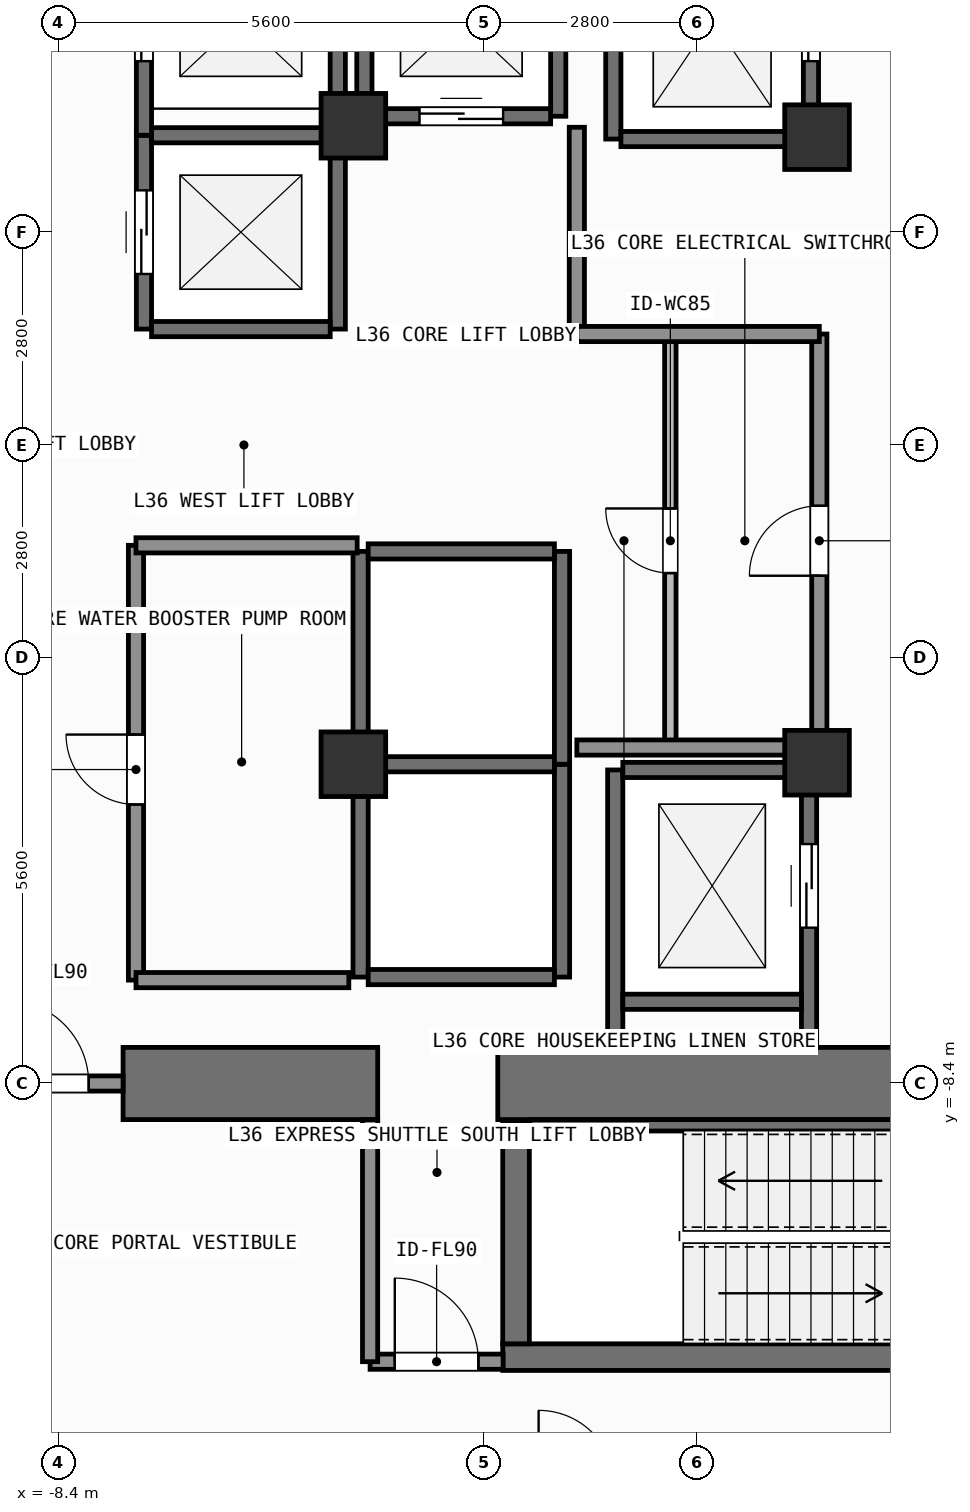
"""IFC4 building model, lengths in metres.
Left out: names, types, materials, properties, quantities, classifications, styles, units other than length and angle.
Written with IfcOpenShell. Run it as: python <this file> out.ifc"""

import sys

from ifc_helpers import new_model, si_unit, direction, frame, frame_2d, origin, origin_2d, place, context, subcontext, project, spatial, rectangle, extrude, element, fill, save


model = new_model("IFC4")
c1 = context("Model", 3, precision=1e-05, world=origin(), true_north=direction((0.0, 1.0)))
c2 = subcontext(c1, "Body", "Model", "MODEL_VIEW")
j1 = project(units=[si_unit("LENGTHUNIT", "METRE"), si_unit("PLANEANGLEUNIT", "RADIAN")], contexts=[c1])
p1 = place(None, origin())
s1 = spatial("IfcSite", under=j1, at=p1, CompositionType="ELEMENT")
p2 = place(p1, origin())
s2 = spatial("IfcBuilding", under=s1, at=p2, CompositionType="ELEMENT")
p3 = place(p2, frame((0.0, 0.0, 144.6)))
s3 = spatial("IfcBuildingStorey", under=s2, at=p3, CompositionType="ELEMENT", Elevation=144.6)
p4 = place(p3, frame((-7.55, -8.4, 0.0), z_axis=(0.0, 0.0, 1.0), x_axis=(1.0, 0.0, 0.0)))
e1 = element("IfcWall", 1, at=p4, inside=s3, PredefinedType="SHEAR", context=c2, shape_type="SweptSolid", body=[
    extrude(rectangle(XDim=3.35, YDim=0.95, at=frame_2d((1.675, 0.0))), origin(), (0.0, 0.0, 1.0), 3.9),
])
p5 = place(p3, frame((-2.62, -8.4, 0.0), z_axis=(0.0, 0.0, 1.0), x_axis=(1.0, 0.0, 0.0)))
e2 = element("IfcWall", 2, at=p5, inside=s3, PredefinedType="SHEAR", context=c2, shape_type="SweptSolid", body=[
    extrude(rectangle(XDim=7.27, YDim=0.95, at=frame_2d((3.635, 0.0))), origin(), (0.0, 0.0, 1.0), 3.9),
])
p6 = place(p3, frame((-2.555, -12.0, 0.0), z_axis=(0.0, 0.0, 1.0), x_axis=(1.0, 0.0, 0.0)))
e3 = element("IfcWall", 3, at=p6, inside=s3, PredefinedType="SHEAR", context=c2, shape_type="SweptSolid", body=[
    extrude(rectangle(XDim=7.31, YDim=0.35, at=frame_2d((3.655, 0.0))), origin(), (0.0, 0.0, 1.0), 3.9),
])
p7 = place(p3, frame((-2.2, -8.95, 0.0), z_axis=(0.0, 0.0, 1.0), x_axis=(1.0, 0.0, 0.0)))
e4 = element("IfcWall", 4, at=p7, inside=s3, PredefinedType="SHEAR", context=c2, shape_type="SweptSolid", body=[
    extrude(rectangle(XDim=6.6, YDim=0.15, at=frame_2d((3.3, 0.0))), origin(), (0.0, 0.0, 1.0), 3.9),
])
p8 = place(p3, frame((-2.38, -11.825, 0.0), z_axis=(0.0, 0.0, 1.0), x_axis=(0.0, 1.0, 0.0)))
e5 = element("IfcWall", 5, at=p8, inside=s3, PredefinedType="SHEAR", context=c2, shape_type="SweptSolid", body=[
    extrude(rectangle(XDim=2.925, YDim=0.35, at=frame_2d((1.462, 0.0))), origin(), (0.0, 0.0, 1.0), 3.9),
])
for number, where, z_axis, x_axis in (
    (6, (-4.52, -4.2, 0.0), (0.0, 0.0, 1.0), (1.0, 0.0, 0.0)),
    (7, (1.58, -4.18, 0.0), (0.0, 0.0, 1.0), (1.0, 0.0, 0.0)),
    (8, (1.58, 4.05, 0.0), (0.0, 0.0, 1.0), (1.0, 0.0, 0.0)),
    (9, (-4.52, 4.2, 0.0), (0.0, 0.0, 1.0), (1.0, 0.0, 0.0)),
):
    element("IfcColumn", number, at=place(p3, frame(where, z_axis=z_axis, x_axis=x_axis)), inside=s3, PredefinedType="COLUMN", context=c2, shape_type="SweptSolid", body=[
        extrude(rectangle(XDim=0.85, YDim=0.85, at=origin_2d()), origin(), (0.0, 0.0, 1.0), 3.9),
    ])
p9 = place(p3, frame((-7.275, 1.525, 0.0), z_axis=(0.0, 0.0, 1.0), x_axis=(0.0, 1.0, 0.0)))
e10 = element("IfcWall", 10, at=p9, inside=s3, PredefinedType="SHEAR", context=c2, shape_type="SweptSolid", body=[
    extrude(rectangle(XDim=2.55, YDim=0.2, at=frame_2d((1.275, 0.0))), origin(), (0.0, 0.0, 1.0), 3.68),
])
p10 = place(p9, frame((0.725, 0.0, 0.0)))
e11 = element("IfcOpeningElement", 11, at=p10, cuts=e10, PredefinedType="OPENING", context=c2, shape_type="SweptSolid", body=[
    extrude(rectangle(XDim=1.1, YDim=2.2, at=frame_2d((0.55, 1.1))), frame((0.0, 0.11, 0.0), z_axis=(0.0, -1.0, 0.0), x_axis=(1.0, 0.0, 0.0)), (0.0, 0.0, 1.0), 0.22),
])
p11 = place(p3, frame((-4.725, 1.525, 0.0), z_axis=(0.0, 0.0, 1.0), x_axis=(0.0, 1.0, 0.0)))
e12 = element("IfcWall", 12, at=p11, inside=s3, PredefinedType="SHEAR", context=c2, shape_type="SweptSolid", body=[
    extrude(rectangle(XDim=2.55, YDim=0.2, at=frame_2d((1.275, 0.0))), origin(), (0.0, 0.0, 1.0), 3.68),
])
for number, where, z_axis, x_axis in (
    (13, (-7.175, 1.525, 0.0), (0.0, 0.0, 1.0), (1.0, 0.0, 0.0)),
    (14, (-7.175, 4.075, 0.0), (0.0, 0.0, 1.0), (1.0, 0.0, 0.0)),
):
    element("IfcWall", number, at=place(p3, frame(where, z_axis=z_axis, x_axis=x_axis)), inside=s3, PredefinedType="SHEAR", context=c2, shape_type="SweptSolid", body=[
        extrude(rectangle(XDim=2.35, YDim=0.2, at=frame_2d((1.175, 0.0))), origin(), (0.0, 0.0, 1.0), 3.68),
    ])
p12 = place(p3, frame((-7.275, 4.075, 0.0), z_axis=(0.0, 0.0, 1.0), x_axis=(0.0, 1.0, 0.0)))
e15 = element("IfcWall", 15, at=p12, inside=s3, PredefinedType="SHEAR", context=c2, shape_type="SweptSolid", body=[
    extrude(rectangle(XDim=2.8, YDim=0.2, at=frame_2d((1.4, 0.0))), origin(), (0.0, 0.0, 1.0), 3.68),
])
p13 = place(p12, frame((0.975, 0.0, 0.0)))
e16 = element("IfcOpeningElement", 16, at=p13, cuts=e15, PredefinedType="OPENING", context=c2, shape_type="SweptSolid", body=[
    extrude(rectangle(XDim=1.1, YDim=2.2, at=frame_2d((0.55, 1.1))), frame((0.0, 0.11, 0.0), z_axis=(0.0, -1.0, 0.0), x_axis=(1.0, 0.0, 0.0)), (0.0, 0.0, 1.0), 0.22),
])
p14 = place(p3, frame((-4.725, 4.075, 0.0), z_axis=(0.0, 0.0, 1.0), x_axis=(0.0, 1.0, 0.0)))
e17 = element("IfcWall", 17, at=p14, inside=s3, PredefinedType="SHEAR", context=c2, shape_type="SweptSolid", body=[
    extrude(rectangle(XDim=2.8, YDim=0.2, at=frame_2d((1.4, 0.0))), origin(), (0.0, 0.0, 1.0), 3.68),
])
for number, where, z_axis, x_axis in (
    (18, (-4.375, 4.325, 0.0), (0.0, 0.0, 1.0), (0.0, 1.0, 0.0)),
    (19, (-1.825, 4.325, 0.0), (0.0, 0.0, 1.0), (0.0, 1.0, 0.0)),
):
    element("IfcWall", number, at=place(p3, frame(where, z_axis=z_axis, x_axis=x_axis)), inside=s3, PredefinedType="SHEAR", context=c2, shape_type="SweptSolid", body=[
        extrude(rectangle(XDim=2.55, YDim=0.2, at=frame_2d((1.275, 0.0))), origin(), (0.0, 0.0, 1.0), 3.68),
    ])
p15 = place(p3, frame((-4.275, 4.325, 0.0), z_axis=(0.0, 0.0, 1.0), x_axis=(1.0, 0.0, 0.0)))
e20 = element("IfcWall", 20, at=p15, inside=s3, PredefinedType="SHEAR", context=c2, shape_type="SweptSolid", body=[
    extrude(rectangle(XDim=2.35, YDim=0.2, at=frame_2d((1.175, 0.0))), origin(), (0.0, 0.0, 1.0), 3.68),
])
p16 = place(p15, frame((0.625, 0.0, 0.0)))
e21 = element("IfcOpeningElement", 21, at=p16, cuts=e20, PredefinedType="OPENING", context=c2, shape_type="SweptSolid", body=[
    extrude(rectangle(XDim=1.1, YDim=2.2, at=frame_2d((0.55, 1.1))), frame((0.0, 0.11, 0.0), z_axis=(0.0, -1.0, 0.0), x_axis=(1.0, 0.0, 0.0)), (0.0, 0.0, 1.0), 0.22),
])
for number, where, z_axis, x_axis in (
    (22, (-4.425, -7.0, 0.0), (0.0, 0.0, 1.0), (0.0, 1.0, 0.0)),
    (23, (-1.775, -7.0, 0.0), (0.0, 0.0, 1.0), (0.0, 1.0, 0.0)),
):
    element("IfcWall", number, at=place(p3, frame(where, z_axis=z_axis, x_axis=x_axis)), inside=s3, PredefinedType="SHEAR", context=c2, shape_type="SweptSolid", body=[
        extrude(rectangle(XDim=2.8, YDim=0.2, at=frame_2d((1.4, 0.0))), origin(), (0.0, 0.0, 1.0), 3.68),
    ])
for number, where, z_axis, x_axis in (
    (24, (-4.325, -7.0, 0.0), (0.0, 0.0, 1.0), (1.0, 0.0, 0.0)),
    (25, (-4.325, -4.2, 0.0), (0.0, 0.0, 1.0), (1.0, 0.0, 0.0)),
):
    element("IfcWall", number, at=place(p3, frame(where, z_axis=z_axis, x_axis=x_axis)), inside=s3, PredefinedType="SHEAR", context=c2, shape_type="SweptSolid", body=[
        extrude(rectangle(XDim=2.45, YDim=0.2, at=frame_2d((1.225, 0.0))), origin(), (0.0, 0.0, 1.0), 3.68),
    ])
for number, where, z_axis, x_axis in (
    (26, (-4.425, -4.2, 0.0), (0.0, 0.0, 1.0), (0.0, 1.0, 0.0)),
    (27, (-1.775, -4.2, 0.0), (0.0, 0.0, 1.0), (0.0, 1.0, 0.0)),
):
    element("IfcWall", number, at=place(p3, frame(where, z_axis=z_axis, x_axis=x_axis)), inside=s3, PredefinedType="SHEAR", context=c2, shape_type="SweptSolid", body=[
        extrude(rectangle(XDim=2.8, YDim=0.2, at=frame_2d((1.4, 0.0))), origin(), (0.0, 0.0, 1.0), 3.68),
    ])
p17 = place(p3, frame((-4.325, -1.4, 0.0), z_axis=(0.0, 0.0, 1.0), x_axis=(1.0, 0.0, 0.0)))
e28 = element("IfcWall", 28, at=p17, inside=s3, PredefinedType="SHEAR", context=c2, shape_type="SweptSolid", body=[
    extrude(rectangle(XDim=2.45, YDim=0.2, at=frame_2d((1.225, 0.0))), origin(), (0.0, 0.0, 1.0), 3.68),
])
p18 = place(p3, frame((-1.1, 4.025, 0.0), z_axis=(0.0, 0.0, 1.0), x_axis=(0.0, 1.0, 0.0)))
e29 = element("IfcWall", 29, at=p18, inside=s3, PredefinedType="SHEAR", context=c2, shape_type="SweptSolid", body=[
    extrude(rectangle(XDim=3.15, YDim=0.2, at=frame_2d((1.575, 0.0))), origin(), (0.0, 0.0, 1.0), 3.68),
])
p19 = place(p3, frame((1.5, 4.025, 0.0), z_axis=(0.0, 0.0, 1.0), x_axis=(0.0, 1.0, 0.0)))
e30 = element("IfcWall", 30, at=p19, inside=s3, PredefinedType="SHEAR", context=c2, shape_type="SweptSolid", body=[
    extrude(rectangle(XDim=3.15, YDim=0.2, at=frame_2d((1.575, 0.0))), origin(), (0.0, 0.0, 1.0), 3.68),
])
p20 = place(p19, frame((1.025, 0.0, 0.0)))
e31 = element("IfcOpeningElement", 31, at=p20, cuts=e30, PredefinedType="OPENING", context=c2, shape_type="SweptSolid", body=[
    extrude(rectangle(XDim=1.1, YDim=2.2, at=frame_2d((0.55, 1.1))), frame((0.0, 0.11, 0.0), z_axis=(0.0, -1.0, 0.0), x_axis=(1.0, 0.0, 0.0)), (0.0, 0.0, 1.0), 0.22),
])
p21 = place(p3, frame((-1.0, 4.025, 0.0), z_axis=(0.0, 0.0, 1.0), x_axis=(1.0, 0.0, 0.0)))
e32 = element("IfcWall", 32, at=p21, inside=s3, PredefinedType="SHEAR", context=c2, shape_type="SweptSolid", body=[
    extrude(rectangle(XDim=2.4, YDim=0.2, at=frame_2d((1.2, 0.0))), origin(), (0.0, 0.0, 1.0), 3.68),
])
p22 = place(p3, frame((-1.075, -7.925, 0.0), z_axis=(0.0, 0.0, 1.0), x_axis=(0.0, 1.0, 0.0)))
e33 = element("IfcWall", 33, at=p22, inside=s3, PredefinedType="SHEAR", context=c2, shape_type="SweptSolid", body=[
    extrude(rectangle(XDim=3.65, YDim=0.2, at=frame_2d((1.825, 0.0))), origin(), (0.0, 0.0, 1.0), 3.68),
])
p23 = place(p3, frame((1.475, -7.925, 0.0), z_axis=(0.0, 0.0, 1.0), x_axis=(0.0, 1.0, 0.0)))
e34 = element("IfcWall", 34, at=p23, inside=s3, PredefinedType="SHEAR", context=c2, shape_type="SweptSolid", body=[
    extrude(rectangle(XDim=3.65, YDim=0.2, at=frame_2d((1.825, 0.0))), origin(), (0.0, 0.0, 1.0), 3.68),
])
p24 = place(p23, frame((1.575, 0.0, 0.0)))
e35 = element("IfcOpeningElement", 35, at=p24, cuts=e34, PredefinedType="OPENING", context=c2, shape_type="SweptSolid", body=[
    extrude(rectangle(XDim=1.1, YDim=2.2, at=frame_2d((0.55, 1.1))), frame((0.0, 0.11, 0.0), z_axis=(0.0, -1.0, 0.0), x_axis=(1.0, 0.0, 0.0)), (0.0, 0.0, 1.0), 0.22),
])
for number, where, z_axis, x_axis in (
    (36, (-0.975, -7.325, 0.0), (0.0, 0.0, 1.0), (1.0, 0.0, 0.0)),
    (37, (-0.975, -4.275, 0.0), (0.0, 0.0, 1.0), (1.0, 0.0, 0.0)),
):
    element("IfcWall", number, at=place(p3, frame(where, z_axis=z_axis, x_axis=x_axis)), inside=s3, PredefinedType="SHEAR", context=c2, shape_type="SweptSolid", body=[
        extrude(rectangle(XDim=2.35, YDim=0.2, at=frame_2d((1.175, 0.0))), origin(), (0.0, 0.0, 1.0), 3.68),
    ])
p25 = place(p3, frame((-9.7, -8.4, 0.0), z_axis=(0.0, 0.0, 1.0), x_axis=(1.0, 0.0, 0.0)))
e38 = element("IfcWall", 38, at=p25, inside=s3, PredefinedType="SOLIDWALL", context=c2, shape_type="SweptSolid", body=[
    extrude(rectangle(XDim=2.15, YDim=0.2, at=frame_2d((1.075, 0.0))), origin(), (0.0, 0.0, 1.0), 2.72),
])
p26 = place(p25, frame((0.598, 0.0, 0.0)))
e39 = element("IfcOpeningElement", 39, at=p26, cuts=e38, PredefinedType="OPENING", context=c2, shape_type="SweptSolid", body=[
    extrude(rectangle(XDim=1.1, YDim=2.15, at=frame_2d((0.55, 1.075))), frame((0.0, 0.11, 0.0), z_axis=(0.0, -1.0, 0.0), x_axis=(1.0, 0.0, 0.0)), (0.0, 0.0, 1.0), 0.22),
])
p27 = place(p3, frame((-4.3, -12.06, 0.0), z_axis=(0.0, 0.0, 1.0), x_axis=(1.0, 0.0, 0.0)))
e40 = element("IfcWall", 40, at=p27, inside=s3, PredefinedType="SOLIDWALL", context=c2, shape_type="SweptSolid", body=[
    extrude(rectangle(XDim=1.75, YDim=0.2, at=frame_2d((0.875, 0.0))), origin(), (0.0, 0.0, 1.0), 3.68),
])
p28 = place(p27, frame((0.325, 0.0, 0.0)))
e41 = element("IfcOpeningElement", 41, at=p28, cuts=e40, PredefinedType="OPENING", context=c2, shape_type="SweptSolid", body=[
    extrude(rectangle(XDim=1.1, YDim=2.15, at=frame_2d((0.55, 1.075))), frame((0.0, 0.11, 0.0), z_axis=(0.0, -1.0, 0.0), x_axis=(1.0, 0.0, 0.0)), (0.0, 0.0, 1.0), 0.22),
])
p29 = place(p3, frame((-0.35, -3.98, 0.0), z_axis=(0.0, 0.0, 1.0), x_axis=(0.0, 1.0, 0.0)))
e42 = element("IfcWall", 42, at=p29, inside=s3, PredefinedType="PARTITIONING", context=c2, shape_type="SweptSolid", body=[
    extrude(rectangle(XDim=5.44, YDim=0.15, at=frame_2d((2.72, 0.0))), origin(), (0.0, 0.0, 1.0), 3.68),
])
p30 = place(p29, frame((2.295, 0.0, 0.0)))
e43 = element("IfcOpeningElement", 43, at=p30, cuts=e42, PredefinedType="OPENING", context=c2, shape_type="SweptSolid", body=[
    extrude(rectangle(XDim=0.85, YDim=2.1, at=frame_2d((0.425, 1.05))), frame((0.0, 0.085, 0.0), z_axis=(0.0, -1.0, 0.0), x_axis=(1.0, 0.0, 0.0)), (0.0, 0.0, 1.0), 0.17),
])
p31 = place(p3, frame((1.61, -3.98, 0.0), z_axis=(0.0, 0.0, 1.0), x_axis=(0.0, 1.0, 0.0)))
e44 = element("IfcWall", 44, at=p31, inside=s3, PredefinedType="SOLIDWALL", context=c2, shape_type="SweptSolid", body=[
    extrude(rectangle(XDim=5.44, YDim=0.2, at=frame_2d((2.72, 0.0))), origin(), (0.0, 0.0, 1.0), 3.68),
])
p32 = place(p31, frame((2.26, 0.0, 0.0)))
e45 = element("IfcOpeningElement", 45, at=p32, cuts=e44, PredefinedType="OPENING", context=c2, shape_type="SweptSolid", body=[
    extrude(rectangle(XDim=0.92, YDim=2.1, at=frame_2d((0.46, 1.05))), frame((0.0, 0.11, 0.0), z_axis=(0.0, -1.0, 0.0), x_axis=(1.0, 0.0, 0.0)), (0.0, 0.0, 1.0), 0.22),
])
p33 = place(p3, frame((-7.38, -7.04, 0.0), z_axis=(0.0, 0.0, 1.0), x_axis=(0.0, 1.0, 0.0)))
e46 = element("IfcWall", 46, at=p33, inside=s3, PredefinedType="SOLIDWALL", context=c2, shape_type="SweptSolid", body=[
    extrude(rectangle(XDim=5.72, YDim=0.2, at=frame_2d((2.86, 0.0))), origin(), (0.0, 0.0, 1.0), 3.68),
])
p34 = place(p33, frame((2.31, 0.0, 0.0)))
e47 = element("IfcOpeningElement", 47, at=p34, cuts=e46, PredefinedType="OPENING", context=c2, shape_type="SweptSolid", body=[
    extrude(rectangle(XDim=0.92, YDim=2.1, at=frame_2d((0.46, 1.05))), frame((0.0, 0.11, 0.0), z_axis=(0.0, -1.0, 0.0), x_axis=(1.0, 0.0, 0.0)), (0.0, 0.0, 1.0), 0.22),
])
p35 = place(p3, frame((-4.3, -12.06, 0.0), z_axis=(0.0, 0.0, 1.0), x_axis=(0.0, 1.0, 0.0)))
e48 = element("IfcWall", 48, at=p35, inside=s3, PredefinedType="SOLIDWALL", context=c2, shape_type="SweptSolid", body=[
    extrude(rectangle(XDim=3.185, YDim=0.2, at=frame_2d((1.593, 0.0))), origin(), (0.0, 0.0, 1.0), 3.68),
])
p36 = place(p3, frame((-7.38, -1.32, 0.0), z_axis=(0.0, 0.0, 1.0), x_axis=(1.0, 0.0, 0.0)))
e49 = element("IfcWall", 49, at=p36, inside=s3, PredefinedType="SOLIDWALL", context=c2, shape_type="SweptSolid", body=[
    extrude(rectangle(XDim=2.91, YDim=0.2, at=frame_2d((1.455, 0.0))), origin(), (0.0, 0.0, 1.0), 3.68),
])
p37 = place(p3, frame((-1.58, 1.48, 0.0), z_axis=(0.0, 0.0, 1.0), x_axis=(0.0, 1.0, 0.0)))
e50 = element("IfcWall", 50, at=p37, inside=s3, PredefinedType="SOLIDWALL", context=c2, shape_type="SweptSolid", body=[
    extrude(rectangle(XDim=2.7, YDim=0.2, at=frame_2d((1.35, 0.0))), origin(), (0.0, 0.0, 1.0), 3.68),
])
for number, where, z_axis, x_axis in (
    (51, (-1.58, -3.98, 0.0), (0.0, 0.0, 1.0), (1.0, 0.0, 0.0)),
    (52, (-1.58, 1.46, 0.0), (0.0, 0.0, 1.0), (1.0, 0.0, 0.0)),
):
    element("IfcWall", number, at=place(p3, frame(where, z_axis=z_axis, x_axis=x_axis)), inside=s3, PredefinedType="SOLIDWALL", context=c2, shape_type="SweptSolid", body=[
        extrude(rectangle(XDim=3.19, YDim=0.2, at=frame_2d((1.595, 0.0))), origin(), (0.0, 0.0, 1.0), 3.68),
    ])
p38 = place(p3, frame((-7.38, -7.04, 0.0), z_axis=(0.0, 0.0, 1.0), x_axis=(1.0, 0.0, 0.0)))
e53 = element("IfcWall", 53, at=p38, inside=s3, PredefinedType="SOLIDWALL", context=c2, shape_type="SweptSolid", body=[
    extrude(rectangle(XDim=2.8, YDim=0.2, at=frame_2d((1.4, 0.0))), origin(), (0.0, 0.0, 1.0), 3.68),
])
p39 = place(p10, origin())
e54 = element("IfcDoor", 54, at=p39, inside=s3, OperationType="SLIDING_TO_LEFT", PredefinedType="DOOR", context=c2, shape_type="SweptSolid", body=[
    extrude(rectangle(XDim=1.1, YDim=2.2, at=frame_2d((0.55, 1.1))), frame((0.0, 0.025, 0.0), z_axis=(0.0, -1.0, 0.0), x_axis=(1.0, 0.0, 0.0)), (0.0, 0.0, 1.0), 0.05),
])
fill(e11, e54)
p40 = place(p13, origin())
e55 = element("IfcDoor", 55, at=p40, inside=s3, OperationType="SLIDING_TO_LEFT", PredefinedType="DOOR", context=c2, shape_type="SweptSolid", body=[
    extrude(rectangle(XDim=1.1, YDim=2.2, at=frame_2d((0.55, 1.1))), frame((0.0, 0.025, 0.0), z_axis=(0.0, -1.0, 0.0), x_axis=(1.0, 0.0, 0.0)), (0.0, 0.0, 1.0), 0.05),
])
fill(e16, e55)
p41 = place(p16, origin())
e56 = element("IfcDoor", 56, at=p41, inside=s3, OperationType="SLIDING_TO_LEFT", PredefinedType="DOOR", context=c2, shape_type="SweptSolid", body=[
    extrude(rectangle(XDim=1.1, YDim=2.2, at=frame_2d((0.55, 1.1))), frame((0.0, 0.025, 0.0), z_axis=(0.0, -1.0, 0.0), x_axis=(1.0, 0.0, 0.0)), (0.0, 0.0, 1.0), 0.05),
])
fill(e21, e56)
p42 = place(p20, origin())
e57 = element("IfcDoor", 57, at=p42, inside=s3, OperationType="SLIDING_TO_LEFT", PredefinedType="DOOR", context=c2, shape_type="SweptSolid", body=[
    extrude(rectangle(XDim=1.1, YDim=2.2, at=frame_2d((0.55, 1.1))), frame((0.0, 0.025, 0.0), z_axis=(0.0, -1.0, 0.0), x_axis=(1.0, 0.0, 0.0)), (0.0, 0.0, 1.0), 0.05),
])
fill(e31, e57)
p43 = place(p24, origin())
e58 = element("IfcDoor", 58, at=p43, inside=s3, OperationType="SLIDING_TO_LEFT", PredefinedType="DOOR", context=c2, shape_type="SweptSolid", body=[
    extrude(rectangle(XDim=1.1, YDim=2.2, at=frame_2d((0.55, 1.1))), frame((0.0, 0.025, 0.0), z_axis=(0.0, -1.0, 0.0), x_axis=(1.0, 0.0, 0.0)), (0.0, 0.0, 1.0), 0.05),
])
fill(e35, e58)
p44 = place(p26, origin())
e59 = element("IfcDoor", 59, at=p44, inside=s3, OperationType="SINGLE_SWING_LEFT", PredefinedType="DOOR", context=c2, shape_type="SweptSolid", body=[
    extrude(rectangle(XDim=1.1, YDim=2.15, at=frame_2d((0.55, 1.075))), frame((0.0, 0.025, 0.0), z_axis=(0.0, -1.0, 0.0), x_axis=(1.0, 0.0, 0.0)), (0.0, 0.0, 1.0), 0.05),
])
fill(e39, e59)
p45 = place(p28, origin())
e60 = element("IfcDoor", 60, at=p45, inside=s3, OperationType="SINGLE_SWING_LEFT", PredefinedType="DOOR", context=c2, shape_type="SweptSolid", body=[
    extrude(rectangle(XDim=1.1, YDim=2.15, at=frame_2d((0.55, 1.075))), frame((0.0, 0.025, 0.0), z_axis=(0.0, -1.0, 0.0), x_axis=(1.0, 0.0, 0.0)), (0.0, 0.0, 1.0), 0.05),
])
fill(e41, e60)
p46 = place(p30, origin())
e61 = element("IfcDoor", 61, at=p46, inside=s3, OperationType="SINGLE_SWING_RIGHT", PredefinedType="DOOR", context=c2, shape_type="SweptSolid", body=[
    extrude(rectangle(XDim=0.85, YDim=2.1, at=frame_2d((0.425, 1.05))), frame((0.0, 0.025, 0.0), z_axis=(0.0, -1.0, 0.0), x_axis=(1.0, 0.0, 0.0)), (0.0, 0.0, 1.0), 0.05),
])
fill(e43, e61)
p47 = place(p32, origin())
e62 = element("IfcDoor", 62, at=p47, inside=s3, OperationType="SINGLE_SWING_LEFT", PredefinedType="DOOR", context=c2, shape_type="SweptSolid", body=[
    extrude(rectangle(XDim=0.92, YDim=2.1, at=frame_2d((0.46, 1.05))), frame((0.0, 0.025, 0.0), z_axis=(0.0, -1.0, 0.0), x_axis=(1.0, 0.0, 0.0)), (0.0, 0.0, 1.0), 0.05),
])
fill(e45, e62)
p48 = place(p34, origin())
e63 = element("IfcDoor", 63, at=p48, inside=s3, OperationType="SINGLE_SWING_RIGHT", PredefinedType="DOOR", context=c2, shape_type="SweptSolid", body=[
    extrude(rectangle(XDim=0.92, YDim=2.1, at=frame_2d((0.46, 1.05))), frame((0.0, 0.025, 0.0), z_axis=(0.0, -1.0, 0.0), x_axis=(1.0, 0.0, 0.0)), (0.0, 0.0, 1.0), 0.05),
])
fill(e47, e63)
save(model, sys.argv[1])
